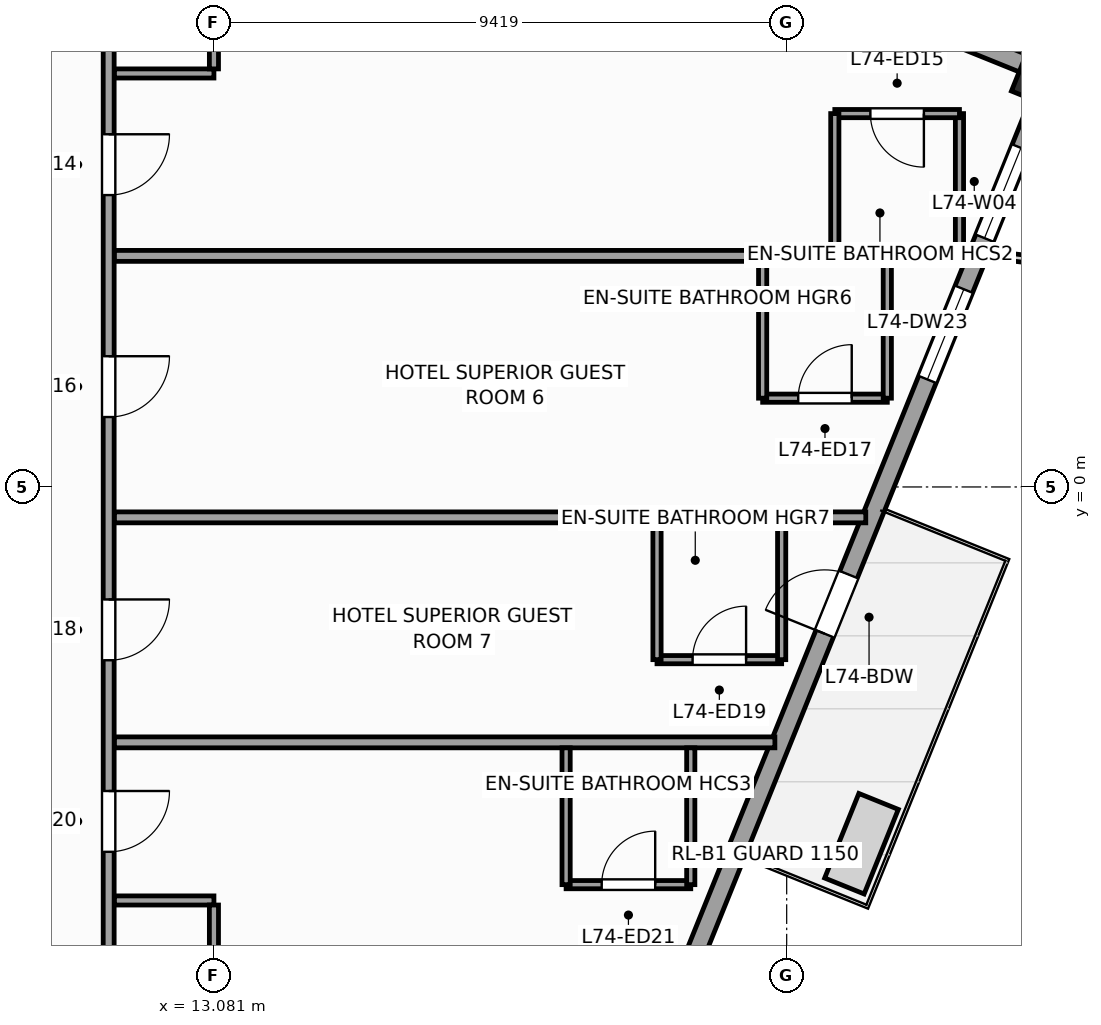
"""IFC4 building model, lengths in metres.
Left out: names, types, materials, properties, quantities, classifications, styles, units other than length and angle.
Written with IfcOpenShell. Run it as: python <this file> out.ifc"""

import sys

from ifc_helpers import new_model, si_unit, direction, frame, frame_2d, origin, origin_2d, place, context, subcontext, project, spatial, rectangle, extrude, source, transform, mapped, element, fill, save


model = new_model("IFC4")
c1 = context("Model", 3, precision=1e-05, world=origin(), true_north=direction((0.0, 1.0)))
c2 = subcontext(c1, "Body", "Model", "MODEL_VIEW")
j1 = project(units=[si_unit("LENGTHUNIT", "METRE"), si_unit("PLANEANGLEUNIT", "RADIAN")], contexts=[c1])
p1 = place(None, origin())
s1 = spatial("IfcSite", under=j1, at=p1, CompositionType="ELEMENT")
p2 = place(p1, origin())
s2 = spatial("IfcBuilding", under=s1, at=p2, CompositionType="ELEMENT")
p3 = place(p2, frame((0.0, 0.0, 301.2)))
s3 = spatial("IfcBuildingStorey", under=s2, at=p3, CompositionType="ELEMENT", Elevation=301.2)
m1 = source(origin(), c2, "Body", "SweptSolid", [
    extrude(rectangle(XDim=0.65, YDim=0.65, at=origin_2d()), origin(), (0.0, 0.0, 1.0), 3.6),
])
p4 = place(p3, frame((26.62, 6.69, 0.0), z_axis=(0.0, 0.0, 1.0), x_axis=(0.374606593416, 0.927183854567, 0.0)))
e1 = element("IfcColumn", 1, at=p4, inside=s3, PredefinedType="COLUMN", context=c2, shape_type="MappedRepresentation", body=[
    mapped(m1, transform((0.0, 0.0, 0.0), scale=1.0)),
])
p5 = place(p3, frame((14.479, -23.813, 0.0), z_axis=(0.0, 0.0, 1.0), x_axis=(0.374609557019, 0.927182657188, 0.0)))
e2 = element("IfcWall", 2, at=p5, inside=s3, PredefinedType="STANDARD", context=c2, shape_type="SweptSolid", body=[
    extrude(rectangle(XDim=33.31, YDim=0.31, at=frame_2d((16.655, 0.0))), origin(), (0.0, 0.0, 1.0), 2.75),
])
p6 = place(p5, frame((23.08, 0.0, 0.0)))
e3 = element("IfcOpeningElement", 3, at=p6, cuts=e2, PredefinedType="OPENING", context=c2, shape_type="SweptSolid", body=[
    extrude(rectangle(XDim=1.05, YDim=2.25, at=frame_2d((0.525, 1.125))), frame((0.0, 0.165, 0.0), z_axis=(0.0, -1.0, 0.0), x_axis=(1.0, 0.0, 0.0)), (0.0, 0.0, 1.0), 0.33),
])
p7 = place(p5, frame((3.197, 0.0, 0.47)))
e4 = element("IfcOpeningElement", 4, at=p7, cuts=e2, PredefinedType="OPENING", context=c2, shape_type="SweptSolid", body=[
    extrude(rectangle(XDim=1.6, YDim=2.1, at=frame_2d((0.8, 1.05))), frame((0.0, 0.165, 0.0), z_axis=(0.0, -1.0, 0.0), x_axis=(1.0, 0.0, 0.0)), (0.0, 0.0, 1.0), 0.33),
])
p8 = place(p5, frame((8.86, 0.0, 0.47)))
e5 = element("IfcOpeningElement", 5, at=p8, cuts=e2, PredefinedType="OPENING", context=c2, shape_type="SweptSolid", body=[
    extrude(rectangle(XDim=1.6, YDim=2.1, at=frame_2d((0.8, 1.05))), frame((0.0, 0.165, 0.0), z_axis=(0.0, -1.0, 0.0), x_axis=(1.0, 0.0, 0.0)), (0.0, 0.0, 1.0), 0.33),
])
p9 = place(p5, frame((14.439, 0.0, 0.47)))
e6 = element("IfcOpeningElement", 6, at=p9, cuts=e2, PredefinedType="OPENING", context=c2, shape_type="SweptSolid", body=[
    extrude(rectangle(XDim=1.6, YDim=2.1, at=frame_2d((0.8, 1.05))), frame((0.0, 0.165, 0.0), z_axis=(0.0, -1.0, 0.0), x_axis=(1.0, 0.0, 0.0)), (0.0, 0.0, 1.0), 0.33),
])
p10 = place(p5, frame((30.097, 0.0, 0.47)))
e7 = element("IfcOpeningElement", 7, at=p10, cuts=e2, PredefinedType="OPENING", context=c2, shape_type="SweptSolid", body=[
    extrude(rectangle(XDim=1.6, YDim=2.1, at=frame_2d((0.8, 1.05))), frame((0.0, 0.165, 0.0), z_axis=(0.0, -1.0, 0.0), x_axis=(1.0, 0.0, 0.0)), (0.0, 0.0, 1.0), 0.33),
])
p11 = place(p5, frame((27.59, 0.0, 0.47)))
e8 = element("IfcOpeningElement", 8, at=p11, cuts=e2, PredefinedType="OPENING", context=c2, shape_type="SweptSolid", body=[
    extrude(rectangle(XDim=1.6, YDim=2.1, at=frame_2d((0.8, 1.05))), frame((0.0, 0.165, 0.0), z_axis=(0.0, -1.0, 0.0), x_axis=(1.0, 0.0, 0.0)), (0.0, 0.0, 1.0), 0.33),
])
p12 = place(p3, frame((26.841, 6.784, 0.0), z_axis=(0.0, 0.0, 1.0), x_axis=(-0.927171722085, 0.374636620962, 0.0)))
e9 = element("IfcWall", 9, at=p12, inside=s3, PredefinedType="STANDARD", context=c2, shape_type="SweptSolid", body=[
    extrude(rectangle(XDim=6.0, YDim=0.31, at=frame_2d((3.0, 0.0))), origin(), (0.0, 0.0, 1.0), 2.65),
])
p13 = place(p3, frame((11.35, -12.35, 0.0), z_axis=(0.0, 0.0, 1.0), x_axis=(0.0, 1.0, 0.0)))
e10 = element("IfcWall", 10, at=p13, inside=s3, PredefinedType="PARTITIONING", context=c2, shape_type="SweptSolid", body=[
    extrude(rectangle(XDim=22.55, YDim=0.18, at=frame_2d((11.275, 0.0))), origin(), (0.0, 0.0, 1.0), 3.35),
])
p14 = place(p13, frame((17.15, 0.0, 0.0)))
e11 = element("IfcOpeningElement", 11, at=p14, cuts=e10, PredefinedType="OPENING", context=c2, shape_type="SweptSolid", body=[
    extrude(rectangle(XDim=1.0, YDim=2.15, at=frame_2d((0.5, 1.075))), frame((0.0, 0.1, 0.0), z_axis=(0.0, -1.0, 0.0), x_axis=(1.0, 0.0, 0.0)), (0.0, 0.0, 1.0), 0.2),
])
p15 = place(p13, frame((13.5, 0.0, 0.0)))
e12 = element("IfcOpeningElement", 12, at=p15, cuts=e10, PredefinedType="OPENING", context=c2, shape_type="SweptSolid", body=[
    extrude(rectangle(XDim=1.0, YDim=2.15, at=frame_2d((0.5, 1.075))), frame((0.0, 0.1, 0.0), z_axis=(0.0, -1.0, 0.0), x_axis=(1.0, 0.0, 0.0)), (0.0, 0.0, 1.0), 0.2),
])
p16 = place(p13, frame((9.5, 0.0, 0.0)))
e13 = element("IfcOpeningElement", 13, at=p16, cuts=e10, PredefinedType="OPENING", context=c2, shape_type="SweptSolid", body=[
    extrude(rectangle(XDim=1.0, YDim=2.15, at=frame_2d((0.5, 1.075))), frame((0.0, 0.1, 0.0), z_axis=(0.0, -1.0, 0.0), x_axis=(1.0, 0.0, 0.0)), (0.0, 0.0, 1.0), 0.2),
])
p17 = place(p13, frame((6.35, 0.0, 0.0)))
e14 = element("IfcOpeningElement", 14, at=p17, cuts=e10, PredefinedType="OPENING", context=c2, shape_type="SweptSolid", body=[
    extrude(rectangle(XDim=1.0, YDim=2.15, at=frame_2d((0.5, 1.075))), frame((0.0, 0.1, 0.0), z_axis=(0.0, -1.0, 0.0), x_axis=(1.0, 0.0, 0.0)), (0.0, 0.0, 1.0), 0.2),
])
p18 = place(p13, frame((2.439, 0.0, 0.0)))
e15 = element("IfcOpeningElement", 15, at=p18, cuts=e10, PredefinedType="OPENING", context=c2, shape_type="SweptSolid", body=[
    extrude(rectangle(XDim=1.0, YDim=2.15, at=frame_2d((0.5, 1.075))), frame((0.0, 0.1, 0.0), z_axis=(0.0, -1.0, 0.0), x_axis=(1.0, 0.0, 0.0)), (0.0, 0.0, 1.0), 0.2),
])
p19 = place(p3, frame((11.445, 3.8, 0.0), z_axis=(0.0, 0.0, 1.0), x_axis=(1.0, 0.0, 0.0)))
e16 = element("IfcWall", 16, at=p19, inside=s3, PredefinedType="PARTITIONING", context=c2, shape_type="SweptSolid", body=[
    extrude(rectangle(XDim=14.093, YDim=0.18, at=frame_2d((7.046, 0.0))), origin(), (0.0, 0.0, 1.0), 3.35),
])
p20 = place(p3, frame((11.445, -0.5, 0.0), z_axis=(0.0, 0.0, 1.0), x_axis=(1.0, 0.0, 0.0)))
e17 = element("IfcWall", 17, at=p20, inside=s3, PredefinedType="PARTITIONING", context=c2, shape_type="SweptSolid", body=[
    extrude(rectangle(XDim=12.356, YDim=0.18, at=frame_2d((6.178, 0.0))), origin(), (0.0, 0.0, 1.0), 3.35),
])
p21 = place(p3, frame((11.445, -4.2, 0.0), z_axis=(0.0, 0.0, 1.0), x_axis=(1.0, 0.0, 0.0)))
e18 = element("IfcWall", 18, at=p21, inside=s3, PredefinedType="PARTITIONING", context=c2, shape_type="SweptSolid", body=[
    extrude(rectangle(XDim=10.861, YDim=0.18, at=frame_2d((5.43, 0.0))), origin(), (0.0, 0.0, 1.0), 3.35),
])
p22 = place(p3, frame((11.445, 6.8, 0.0), z_axis=(0.0, 0.0, 1.0), x_axis=(1.0, 0.0, 0.0)))
e19 = element("IfcWall", 19, at=p22, inside=s3, PredefinedType="PARTITIONING", context=c2, shape_type="SweptSolid", body=[
    extrude(rectangle(XDim=1.636, YDim=0.15, at=frame_2d((0.818, 0.0))), origin(), (0.0, 0.0, 1.0), 3.35),
])
p23 = place(p3, frame((13.081, 6.875, 0.0), z_axis=(0.0, 0.0, 1.0), x_axis=(0.0, 1.0, 0.0)))
e20 = element("IfcWall", 20, at=p23, inside=s3, PredefinedType="PARTITIONING", context=c2, shape_type="SweptSolid", body=[
    extrude(rectangle(XDim=11.843, YDim=0.15, at=frame_2d((5.921, 0.0))), origin(), (0.0, 0.0, 1.0), 2.45),
])
p24 = place(p3, frame((11.445, -6.8, 0.0), z_axis=(0.0, 0.0, 1.0), x_axis=(1.0, 0.0, 0.0)))
e21 = element("IfcWall", 21, at=p24, inside=s3, PredefinedType="PARTITIONING", context=c2, shape_type="SweptSolid", body=[
    extrude(rectangle(XDim=1.636, YDim=0.15, at=frame_2d((0.818, 0.0))), origin(), (0.0, 0.0, 1.0), 3.35),
])
p25 = place(p3, frame((13.081, -6.875, 0.0), z_axis=(0.0, 0.0, 1.0), x_axis=(0.0, -1.0, 0.0)))
e22 = element("IfcWall", 22, at=p25, inside=s3, PredefinedType="PARTITIONING", context=c2, shape_type="SweptSolid", body=[
    extrude(rectangle(XDim=15.942, YDim=0.15, at=frame_2d((7.971, 0.0))), origin(), (0.0, 0.0, 1.0), 2.45),
])
p26 = place(p3, frame((25.342, 3.89, 0.0), z_axis=(0.0, 0.0, 1.0), x_axis=(0.0, 1.0, 0.0)))
e23 = element("IfcWall", 23, at=p26, inside=s3, PredefinedType="PARTITIONING", context=c2, shape_type="SweptSolid", body=[
    extrude(rectangle(XDim=2.25, YDim=0.135, at=frame_2d((1.125, 0.0))), origin(), (0.0, 0.0, 1.0), 2.75),
])
p27 = place(p3, frame((23.292, 6.14, 0.0), z_axis=(0.0, 0.0, 1.0), x_axis=(1.0, 0.0, 0.0)))
e24 = element("IfcWall", 24, at=p27, inside=s3, PredefinedType="PARTITIONING", context=c2, shape_type="SweptSolid", body=[
    extrude(rectangle(XDim=2.05, YDim=0.135, at=frame_2d((1.025, 0.0))), origin(), (0.0, 0.0, 1.0), 3.35),
])
p28 = place(p27, frame((0.585, 0.0, 0.0)))
e25 = element("IfcOpeningElement", 25, at=p28, cuts=e24, PredefinedType="OPENING", context=c2, shape_type="SweptSolid", body=[
    extrude(rectangle(XDim=0.88, YDim=2.1, at=frame_2d((0.44, 1.05))), frame((0.0, 0.078, 0.0), z_axis=(0.0, -1.0, 0.0), x_axis=(1.0, 0.0, 0.0)), (0.0, 0.0, 1.0), 0.155),
])
p29 = place(p3, frame((23.292, 3.89, 0.0), z_axis=(0.0, 0.0, 1.0), x_axis=(0.0, 1.0, 0.0)))
e26 = element("IfcWall", 26, at=p29, inside=s3, PredefinedType="PARTITIONING", context=c2, shape_type="SweptSolid", body=[
    extrude(rectangle(XDim=2.25, YDim=0.135, at=frame_2d((1.125, 0.0))), origin(), (0.0, 0.0, 1.0), 2.95),
])
p30 = place(p3, frame((22.105, 1.46, 0.0), z_axis=(0.0, 0.0, 1.0), x_axis=(1.0, 0.0, 0.0)))
e27 = element("IfcWall", 27, at=p30, inside=s3, PredefinedType="PARTITIONING", context=c2, shape_type="SweptSolid", body=[
    extrude(rectangle(XDim=2.05, YDim=0.135, at=frame_2d((1.025, 0.0))), origin(), (0.0, 0.0, 1.0), 3.35),
])
p31 = place(p30, frame((0.585, 0.0, 0.0)))
e28 = element("IfcOpeningElement", 28, at=p31, cuts=e27, PredefinedType="OPENING", context=c2, shape_type="SweptSolid", body=[
    extrude(rectangle(XDim=0.88, YDim=2.1, at=frame_2d((0.44, 1.05))), frame((0.0, 0.078, 0.0), z_axis=(0.0, -1.0, 0.0), x_axis=(1.0, 0.0, 0.0)), (0.0, 0.0, 1.0), 0.155),
])
for number, where, z_axis, x_axis in (
    (29, (24.155, 1.46, 0.0), (0.0, 0.0, 1.0), (0.0, 1.0, 0.0)),
    (30, (22.105, 1.46, 0.0), (0.0, 0.0, 1.0), (0.0, 1.0, 0.0)),
):
    element("IfcWall", number, at=place(p3, frame(where, z_axis=z_axis, x_axis=x_axis)), inside=s3, PredefinedType="PARTITIONING", context=c2, shape_type="SweptSolid", body=[
        extrude(rectangle(XDim=2.25, YDim=0.135, at=frame_2d((1.125, 0.0))), origin(), (0.0, 0.0, 1.0), 3.35),
    ])
p32 = place(p3, frame((20.367, -2.84, 0.0), z_axis=(0.0, 0.0, 1.0), x_axis=(1.0, 0.0, 0.0)))
e31 = element("IfcWall", 31, at=p32, inside=s3, PredefinedType="PARTITIONING", context=c2, shape_type="SweptSolid", body=[
    extrude(rectangle(XDim=2.05, YDim=0.135, at=frame_2d((1.025, 0.0))), origin(), (0.0, 0.0, 1.0), 3.35),
])
p33 = place(p32, frame((0.585, 0.0, 0.0)))
e32 = element("IfcOpeningElement", 32, at=p33, cuts=e31, PredefinedType="OPENING", context=c2, shape_type="SweptSolid", body=[
    extrude(rectangle(XDim=0.88, YDim=2.1, at=frame_2d((0.44, 1.05))), frame((0.0, 0.078, 0.0), z_axis=(0.0, -1.0, 0.0), x_axis=(1.0, 0.0, 0.0)), (0.0, 0.0, 1.0), 0.155),
])
for number, where, z_axis, x_axis in (
    (33, (22.417, -2.84, 0.0), (0.0, 0.0, 1.0), (0.0, 1.0, 0.0)),
    (34, (20.367, -2.84, 0.0), (0.0, 0.0, 1.0), (0.0, 1.0, 0.0)),
):
    element("IfcWall", number, at=place(p3, frame(where, z_axis=z_axis, x_axis=x_axis)), inside=s3, PredefinedType="PARTITIONING", context=c2, shape_type="SweptSolid", body=[
        extrude(rectangle(XDim=2.25, YDim=0.135, at=frame_2d((1.125, 0.0))), origin(), (0.0, 0.0, 1.0), 3.35),
    ])
p34 = place(p3, frame((18.873, -6.54, 0.0), z_axis=(0.0, 0.0, 1.0), x_axis=(1.0, 0.0, 0.0)))
e35 = element("IfcWall", 35, at=p34, inside=s3, PredefinedType="PARTITIONING", context=c2, shape_type="SweptSolid", body=[
    extrude(rectangle(XDim=2.05, YDim=0.135, at=frame_2d((1.025, 0.0))), origin(), (0.0, 0.0, 1.0), 3.35),
])
p35 = place(p34, frame((0.585, 0.0, 0.0)))
e36 = element("IfcOpeningElement", 36, at=p35, cuts=e35, PredefinedType="OPENING", context=c2, shape_type="SweptSolid", body=[
    extrude(rectangle(XDim=0.88, YDim=2.1, at=frame_2d((0.44, 1.05))), frame((0.0, 0.078, 0.0), z_axis=(0.0, -1.0, 0.0), x_axis=(1.0, 0.0, 0.0)), (0.0, 0.0, 1.0), 0.155),
])
for number, where, z_axis, x_axis in (
    (37, (20.923, -6.54, 0.0), (0.0, 0.0, 1.0), (0.0, 1.0, 0.0)),
    (38, (18.873, -6.54, 0.0), (0.0, 0.0, 1.0), (0.0, 1.0, 0.0)),
):
    element("IfcWall", number, at=place(p3, frame(where, z_axis=z_axis, x_axis=x_axis)), inside=s3, PredefinedType="PARTITIONING", context=c2, shape_type="SweptSolid", body=[
        extrude(rectangle(XDim=2.25, YDim=0.135, at=frame_2d((1.125, 0.0))), origin(), (0.0, 0.0, 1.0), 3.35),
    ])
m2 = source(origin(), c2, "Body", "SweptSolid", [
    extrude(rectangle(XDim=1.05, YDim=2.25, at=frame_2d((0.525, 1.125))), frame((0.0, 0.025, 0.0), z_axis=(0.0, -1.0, 0.0), x_axis=(1.0, 0.0, 0.0)), (0.0, 0.0, 1.0), 0.05),
])
p36 = place(p6, origin())
e39 = element("IfcDoor", 39, at=p36, inside=s3, OperationType="SINGLE_SWING_LEFT", PredefinedType="DOOR", context=c2, shape_type="MappedRepresentation", body=[
    mapped(m2, transform((0.0, 0.0, 0.0), scale=1.0)),
])
fill(e3, e39)
m3 = source(origin(), c2, "Body", "SweptSolid", [
    extrude(rectangle(XDim=1.6, YDim=2.1, at=frame_2d((0.8, 1.05))), frame((0.0, 0.03, 0.0), z_axis=(0.0, -1.0, 0.0), x_axis=(1.0, 0.0, 0.0)), (0.0, 0.0, 1.0), 0.06),
])
p37 = place(p10, origin())
e40 = element("IfcWindow", 40, at=p37, inside=s3, PartitioningType="SINGLE_PANEL", PredefinedType="WINDOW", context=c2, shape_type="MappedRepresentation", body=[
    mapped(m3, transform((0.0, 0.0, 0.0), scale=1.0)),
])
fill(e7, e40)
m4 = source(origin(), c2, "Body", "SweptSolid", [
    extrude(rectangle(XDim=1.0, YDim=2.15, at=frame_2d((0.5, 1.075))), frame((0.0, 0.025, 0.0), z_axis=(0.0, -1.0, 0.0), x_axis=(1.0, 0.0, 0.0)), (0.0, 0.0, 1.0), 0.05),
])
p38 = place(p14, frame((1.0, 0.0, 0.0), z_axis=(0.0, 0.0, 1.0), x_axis=(-1.0, 0.0, 0.0)))
e41 = element("IfcDoor", 41, at=p38, inside=s3, OperationType="SINGLE_SWING_RIGHT", PredefinedType="DOOR", context=c2, shape_type="MappedRepresentation", body=[
    mapped(m4, transform((0.0, 0.0, 0.0), scale=1.0)),
])
fill(e11, e41)
m5 = source(origin(), c2, "Body", "SweptSolid", [
    extrude(rectangle(XDim=0.88, YDim=2.1, at=frame_2d((0.44, 1.05))), frame((0.0, 0.025, 0.0), z_axis=(0.0, -1.0, 0.0), x_axis=(1.0, 0.0, 0.0)), (0.0, 0.0, 1.0), 0.05),
])
p39 = place(p28, frame((0.88, 0.0, 0.0), z_axis=(0.0, 0.0, 1.0), x_axis=(-1.0, 0.0, 0.0)))
e42 = element("IfcDoor", 42, at=p39, inside=s3, OperationType="SINGLE_SWING_RIGHT", PredefinedType="DOOR", context=c2, shape_type="MappedRepresentation", body=[
    mapped(m5, transform((0.0, 0.0, 0.0), scale=1.0)),
])
fill(e25, e42)
p40 = place(p15, frame((1.0, 0.0, 0.0), z_axis=(0.0, 0.0, 1.0), x_axis=(-1.0, 0.0, 0.0)))
e43 = element("IfcDoor", 43, at=p40, inside=s3, OperationType="SINGLE_SWING_RIGHT", PredefinedType="DOOR", context=c2, shape_type="MappedRepresentation", body=[
    mapped(m4, transform((0.0, 0.0, 0.0), scale=1.0)),
])
fill(e12, e43)
p41 = place(p31, origin())
e44 = element("IfcDoor", 44, at=p41, inside=s3, OperationType="SINGLE_SWING_RIGHT", PredefinedType="DOOR", context=c2, shape_type="MappedRepresentation", body=[
    mapped(m5, transform((0.0, 0.0, 0.0), scale=1.0)),
])
fill(e28, e44)
p42 = place(p16, frame((1.0, 0.0, 0.0), z_axis=(0.0, 0.0, 1.0), x_axis=(-1.0, 0.0, 0.0)))
e45 = element("IfcDoor", 45, at=p42, inside=s3, OperationType="SINGLE_SWING_RIGHT", PredefinedType="DOOR", context=c2, shape_type="MappedRepresentation", body=[
    mapped(m4, transform((0.0, 0.0, 0.0), scale=1.0)),
])
fill(e13, e45)
p43 = place(p33, origin())
e46 = element("IfcDoor", 46, at=p43, inside=s3, OperationType="SINGLE_SWING_RIGHT", PredefinedType="DOOR", context=c2, shape_type="MappedRepresentation", body=[
    mapped(m5, transform((0.0, 0.0, 0.0), scale=1.0)),
])
fill(e32, e46)
p44 = place(p17, frame((1.0, 0.0, 0.0), z_axis=(0.0, 0.0, 1.0), x_axis=(-1.0, 0.0, 0.0)))
e47 = element("IfcDoor", 47, at=p44, inside=s3, OperationType="SINGLE_SWING_RIGHT", PredefinedType="DOOR", context=c2, shape_type="MappedRepresentation", body=[
    mapped(m4, transform((0.0, 0.0, 0.0), scale=1.0)),
])
fill(e14, e47)
p45 = place(p35, origin())
e48 = element("IfcDoor", 48, at=p45, inside=s3, OperationType="SINGLE_SWING_RIGHT", PredefinedType="DOOR", context=c2, shape_type="MappedRepresentation", body=[
    mapped(m5, transform((0.0, 0.0, 0.0), scale=1.0)),
])
fill(e36, e48)
p46 = place(p11, origin())
e49 = element("IfcWindow", 49, at=p46, inside=s3, PartitioningType="SINGLE_PANEL", PredefinedType="WINDOW", context=c2, shape_type="MappedRepresentation", body=[
    mapped(m3, transform((0.0, 0.0, 0.0), scale=1.0)),
])
fill(e8, e49)
save(model, sys.argv[1])
